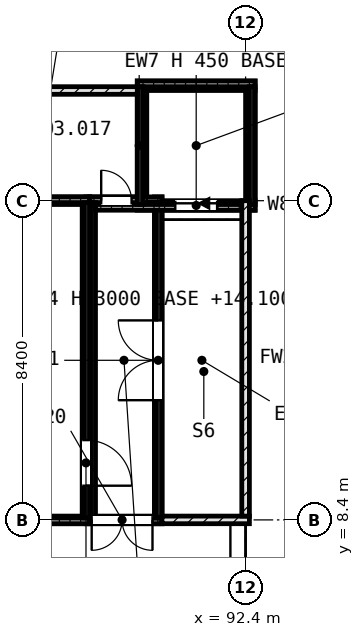
"""IFC4 building model, lengths in metres.
Left out: names, types, materials, properties, quantities, classifications, styles, units other than length and angle.
Written with IfcOpenShell. Run it as: python <this file> out.ifc"""

import sys

from ifc_helpers import new_model, si_unit, direction, frame, frame_2d, origin, place, context, subcontext, project, spatial, rectangle, extrude, element, fill, save


model = new_model("IFC4")
c1 = context("Model", 3, precision=1e-05, world=origin(), true_north=direction((0.0, 1.0)))
c2 = subcontext(c1, "Body", "Model", "MODEL_VIEW")
j1 = project(units=[si_unit("LENGTHUNIT", "METRE"), si_unit("PLANEANGLEUNIT", "RADIAN")], contexts=[c1])
p1 = place(None, origin())
s1 = spatial("IfcSite", under=j1, at=p1, CompositionType="ELEMENT")
p2 = place(p1, origin())
s2 = spatial("IfcBuilding", under=s1, at=p2, CompositionType="ELEMENT")
p3 = place(p2, frame((0.0, 0.0, 14.4)))
s3 = spatial("IfcBuildingStorey", under=s2, at=p3, CompositionType="ELEMENT", Elevation=14.4)
p4 = place(p3, frame((89.55, 16.675, -0.3), z_axis=(0.0, 0.0, 1.0), x_axis=(1.0, 0.0, 0.0)))
e1 = element("IfcWall", 1, at=p4, inside=s3, PredefinedType="SHEAR", context=c2, shape_type="SweptSolid", body=[
    extrude(rectangle(XDim=3.1, YDim=0.25, at=frame_2d((1.55, 0.0))), origin(), (0.0, 0.0, 1.0), 3.0),
])
p5 = place(p4, frame((1.0, 0.0, 0.3)))
e2 = element("IfcOpeningElement", 2, at=p5, cuts=e1, PredefinedType="OPENING", context=c2, shape_type="SweptSolid", body=[
    extrude(rectangle(XDim=1.1, YDim=2.1, at=frame_2d((0.55, 1.05))), frame((0.0, 0.135, 0.0), z_axis=(0.0, -1.0, 0.0), x_axis=(1.0, 0.0, 0.0)), (0.0, 0.0, 1.0), 0.27),
])
p6 = place(p3, frame((89.55, 19.825, -0.3), z_axis=(0.0, 0.0, 1.0), x_axis=(1.0, 0.0, 0.0)))
e3 = element("IfcWall", 3, at=p6, inside=s3, PredefinedType="SHEAR", context=c2, shape_type="SweptSolid", body=[
    extrude(rectangle(XDim=3.1, YDim=0.25, at=frame_2d((1.55, 0.0))), origin(), (0.0, 0.0, 1.0), 3.0),
])
for number, where, z_axis, x_axis in (
    (4, (89.675, 16.8, -0.3), (0.0, 0.0, 1.0), (0.0, 1.0, 0.0)),
    (5, (92.525, 16.8, -0.3), (0.0, 0.0, 1.0), (0.0, 1.0, 0.0)),
):
    element("IfcWall", number, at=place(p3, frame(where, z_axis=z_axis, x_axis=x_axis)), inside=s3, PredefinedType="SHEAR", context=c2, shape_type="SweptSolid", body=[
        extrude(rectangle(XDim=2.9, YDim=0.25, at=frame_2d((1.45, 0.0))), origin(), (0.0, 0.0, 1.0), 3.0),
    ])
for number, where, z_axis, x_axis in (
    (6, (83.9, 8.4, -0.3), (0.0, 0.0, 1.0), (1.0, 0.0, 0.0)),
    (7, (83.9, 16.8, -0.3), (0.0, 0.0, 1.0), (1.0, 0.0, 0.0)),
):
    element("IfcWall", number, at=place(p3, frame(where, z_axis=z_axis, x_axis=x_axis)), inside=s3, PredefinedType="SHEAR", context=c2, shape_type="SweptSolid", body=[
        extrude(rectangle(XDim=4.4, YDim=0.2, at=frame_2d((2.2, 0.0))), origin(), (0.0, 0.0, 1.0), 3.0),
    ])
p7 = place(p3, frame((88.2, 8.5, -0.3), z_axis=(0.0, 0.0, 1.0), x_axis=(0.0, 1.0, 0.0)))
e8 = element("IfcWall", 8, at=p7, inside=s3, PredefinedType="SHEAR", context=c2, shape_type="SweptSolid", body=[
    extrude(rectangle(XDim=8.2, YDim=0.2, at=frame_2d((4.1, 0.0))), origin(), (0.0, 0.0, 1.0), 3.0),
])
p8 = place(p7, frame((0.8, 0.0, 0.3)))
e9 = element("IfcOpeningElement", 9, at=p8, cuts=e8, PredefinedType="OPENING", context=c2, shape_type="SweptSolid", body=[
    extrude(rectangle(XDim=1.2, YDim=2.2, at=frame_2d((0.6, 1.1))), frame((0.0, 0.11, 0.0), z_axis=(0.0, -1.0, 0.0), x_axis=(1.0, 0.0, 0.0)), (0.0, 0.0, 1.0), 0.22),
])
p9 = place(p3, frame((88.2, 8.4, -0.3), z_axis=(0.0, 0.0, 1.0), x_axis=(1.0, 0.0, 0.0)))
e10 = element("IfcWall", 10, at=p9, inside=s3, PredefinedType="SHEAR", context=c2, shape_type="SweptSolid", body=[
    extrude(rectangle(XDim=1.9, YDim=0.2, at=frame_2d((0.95, 0.0))), origin(), (0.0, 0.0, 1.0), 3.0),
])
p10 = place(p9, frame((1.75, 0.0, 0.3), z_axis=(0.0, 0.0, 1.0), x_axis=(-1.0, 0.0, 0.0)))
e11 = element("IfcOpeningElement", 11, at=p10, cuts=e10, PredefinedType="OPENING", context=c2, shape_type="SweptSolid", body=[
    extrude(rectangle(XDim=1.6, YDim=2.2, at=frame_2d((0.8, 1.1))), frame((0.0, 0.11, 0.0), z_axis=(0.0, -1.0, 0.0), x_axis=(1.0, 0.0, 0.0)), (0.0, 0.0, 1.0), 0.22),
])
p11 = place(p3, frame((88.2, 16.8, -0.3), z_axis=(0.0, 0.0, 1.0), x_axis=(1.0, 0.0, 0.0)))
e12 = element("IfcWall", 12, at=p11, inside=s3, PredefinedType="SHEAR", context=c2, shape_type="SweptSolid", body=[
    extrude(rectangle(XDim=1.35, YDim=0.2, at=frame_2d((0.675, 0.0))), origin(), (0.0, 0.0, 1.0), 3.0),
])
p12 = place(p11, frame((0.4, 0.0, 0.3)))
e13 = element("IfcOpeningElement", 13, at=p12, cuts=e12, PredefinedType="OPENING", context=c2, shape_type="SweptSolid", body=[
    extrude(rectangle(XDim=0.8, YDim=2.1, at=frame_2d((0.4, 1.05))), frame((0.0, 0.11, 0.0), z_axis=(0.0, -1.0, 0.0), x_axis=(1.0, 0.0, 0.0)), (0.0, 0.0, 1.0), 0.22),
])
p13 = place(p3, frame((90.1, 8.3, -0.3), z_axis=(0.0, 0.0, 1.0), x_axis=(0.0, 1.0, 0.0)))
e14 = element("IfcWall", 14, at=p13, inside=s3, PredefinedType="SHEAR", context=c2, shape_type="SweptSolid", body=[
    extrude(rectangle(XDim=8.6, YDim=0.2, at=frame_2d((4.3, 0.0))), origin(), (0.0, 0.0, 1.0), 3.0),
])
p14 = place(p13, frame((3.25, 0.0, 0.3)))
e15 = element("IfcOpeningElement", 15, at=p14, cuts=e14, PredefinedType="OPENING", context=c2, shape_type="SweptSolid", body=[
    extrude(rectangle(XDim=2.1, YDim=2.2, at=frame_2d((1.05, 1.1))), frame((0.0, 0.11, 0.0), z_axis=(0.0, -1.0, 0.0), x_axis=(1.0, 0.0, 0.0)), (0.0, 0.0, 1.0), 0.22),
])
for number, where, z_axis, x_axis in (
    (16, (83.9, 8.375, 2.9), (0.0, 0.0, 1.0), (1.0, 0.0, 0.0)),
    (17, (83.9, 16.825, 2.9), (0.0, 0.0, 1.0), (1.0, 0.0, 0.0)),
):
    element("IfcWall", number, at=place(p3, frame(where, z_axis=z_axis, x_axis=x_axis)), inside=s3, PredefinedType="PARAPET", context=c2, shape_type="SweptSolid", body=[
        extrude(rectangle(XDim=4.4, YDim=0.15, at=frame_2d((2.2, 0.0))), origin(), (0.0, 0.0, 1.0), 0.45),
    ])
p15 = place(p3, frame((88.225, 8.45, 2.9), z_axis=(0.0, 0.0, 1.0), x_axis=(0.0, 1.0, 0.0)))
e18 = element("IfcWall", 18, at=p15, inside=s3, PredefinedType="PARAPET", context=c2, shape_type="SweptSolid", body=[
    extrude(rectangle(XDim=8.3, YDim=0.15, at=frame_2d((4.15, 0.0))), origin(), (0.0, 0.0, 1.0), 0.45),
])
for number, where, z_axis, x_axis in (
    (19, (88.3, 8.375, 2.9), (0.0, 0.0, 1.0), (1.0, 0.0, 0.0)),
    (20, (88.3, 16.825, 2.9), (0.0, 0.0, 1.0), (1.0, 0.0, 0.0)),
):
    element("IfcWall", number, at=place(p3, frame(where, z_axis=z_axis, x_axis=x_axis)), inside=s3, PredefinedType="PARAPET", context=c2, shape_type="SweptSolid", body=[
        extrude(rectangle(XDim=1.9, YDim=0.15, at=frame_2d((0.95, 0.0))), origin(), (0.0, 0.0, 1.0), 0.45),
    ])
for number, where, z_axis, x_axis in (
    (21, (88.375, 8.45, 2.9), (0.0, 0.0, 1.0), (0.0, 1.0, 0.0)),
    (22, (90.125, 8.45, 2.9), (0.0, 0.0, 1.0), (0.0, 1.0, 0.0)),
):
    element("IfcWall", number, at=place(p3, frame(where, z_axis=z_axis, x_axis=x_axis)), inside=s3, PredefinedType="PARAPET", context=c2, shape_type="SweptSolid", body=[
        extrude(rectangle(XDim=8.3, YDim=0.15, at=frame_2d((4.15, 0.0))), origin(), (0.0, 0.0, 1.0), 0.45),
    ])
p16 = place(p3, frame((88.45, 16.625, 2.9), z_axis=(0.0, 0.0, 1.0), x_axis=(1.0, 0.0, 0.0)))
e23 = element("IfcWall", 23, at=p16, inside=s3, PredefinedType="PARAPET", context=c2, shape_type="SweptSolid", body=[
    extrude(rectangle(XDim=4.2, YDim=0.15, at=frame_2d((2.1, 0.0))), origin(), (0.0, 0.0, 1.0), 0.45),
])
p17 = place(p3, frame((89.55, 19.875, 2.9), z_axis=(0.0, 0.0, 1.0), x_axis=(1.0, 0.0, 0.0)))
e24 = element("IfcWall", 24, at=p17, inside=s3, PredefinedType="PARAPET", context=c2, shape_type="SweptSolid", body=[
    extrude(rectangle(XDim=3.1, YDim=0.15, at=frame_2d((1.55, 0.0))), origin(), (0.0, 0.0, 1.0), 0.45),
])
for number, where, z_axis, x_axis in (
    (25, (89.625, 16.7, 2.9), (0.0, 0.0, 1.0), (0.0, 1.0, 0.0)),
    (26, (92.575, 16.7, 2.9), (0.0, 0.0, 1.0), (0.0, 1.0, 0.0)),
):
    element("IfcWall", number, at=place(p3, frame(where, z_axis=z_axis, x_axis=x_axis)), inside=s3, PredefinedType="PARAPET", context=c2, shape_type="SweptSolid", body=[
        extrude(rectangle(XDim=3.1, YDim=0.15, at=frame_2d((1.55, 0.0))), origin(), (0.0, 0.0, 1.0), 0.45),
    ])
p18 = place(p3, frame((90.2, 8.4, 0.0), z_axis=(0.0, 0.0, 1.0), x_axis=(1.0, 0.0, 0.0)))
e27 = element("IfcWall", 27, at=p18, inside=s3, PredefinedType="SOLIDWALL", context=c2, shape_type="SweptSolid", body=[
    extrude(rectangle(XDim=2.3, YDim=0.2, at=frame_2d((1.15, 0.0))), origin(), (0.0, 0.0, 1.0), 2.7),
])
p19 = place(p3, frame((84.0, 19.7, 0.0), z_axis=(0.0, 0.0, 1.0), x_axis=(1.0, 0.0, 0.0)))
e28 = element("IfcWall", 28, at=p19, inside=s3, PredefinedType="SOLIDWALL", context=c2, shape_type="SweptSolid", body=[
    extrude(rectangle(XDim=5.55, YDim=0.2, at=frame_2d((2.775, 0.0))), origin(), (0.0, 0.0, 1.0), 2.7),
])
p20 = place(p3, frame((92.4, 8.5, 0.0), z_axis=(0.0, 0.0, 1.0), x_axis=(0.0, 1.0, 0.0)))
e29 = element("IfcWall", 29, at=p20, inside=s3, PredefinedType="SOLIDWALL", context=c2, shape_type="SweptSolid", body=[
    extrude(rectangle(XDim=8.3, YDim=0.2, at=frame_2d((4.15, 0.0))), origin(), (0.0, 0.0, 1.0), 2.7),
])
p21 = place(p14, origin())
e30 = element("IfcDoor", 30, at=p21, inside=s3, OperationType="DOUBLE_DOOR_SINGLE_SWING", PredefinedType="DOOR", context=c2, shape_type="SweptSolid", body=[
    extrude(rectangle(XDim=2.1, YDim=2.2, at=frame_2d((1.05, 1.1))), frame((0.0, 0.025, 0.0), z_axis=(0.0, -1.0, 0.0), x_axis=(1.0, 0.0, 0.0)), (0.0, 0.0, 1.0), 0.05),
])
fill(e15, e30)
p22 = place(p8, origin())
e31 = element("IfcDoor", 31, at=p22, inside=s3, OperationType="SINGLE_SWING_LEFT", PredefinedType="DOOR", context=c2, shape_type="SweptSolid", body=[
    extrude(rectangle(XDim=1.2, YDim=2.2, at=frame_2d((0.6, 1.1))), frame((0.0, 0.025, 0.0), z_axis=(0.0, -1.0, 0.0), x_axis=(1.0, 0.0, 0.0)), (0.0, 0.0, 1.0), 0.05),
])
fill(e9, e31)
p23 = place(p5, origin())
e32 = element("IfcDoor", 32, at=p23, inside=s3, OperationType="SLIDING_TO_LEFT", PredefinedType="DOOR", context=c2, shape_type="SweptSolid", body=[
    extrude(rectangle(XDim=1.1, YDim=2.1, at=frame_2d((0.55, 1.05))), frame((0.0, 0.025, 0.0), z_axis=(0.0, -1.0, 0.0), x_axis=(1.0, 0.0, 0.0)), (0.0, 0.0, 1.0), 0.05),
])
fill(e2, e32)
p24 = place(p12, origin())
e33 = element("IfcDoor", 33, at=p24, inside=s3, OperationType="SINGLE_SWING_RIGHT", PredefinedType="DOOR", context=c2, shape_type="SweptSolid", body=[
    extrude(rectangle(XDim=0.8, YDim=2.1, at=frame_2d((0.4, 1.05))), frame((0.0, 0.025, 0.0), z_axis=(0.0, -1.0, 0.0), x_axis=(1.0, 0.0, 0.0)), (0.0, 0.0, 1.0), 0.05),
])
fill(e13, e33)
p25 = place(p10, origin())
e34 = element("IfcDoor", 34, at=p25, inside=s3, OperationType="DOUBLE_DOOR_SINGLE_SWING", PredefinedType="DOOR", context=c2, shape_type="SweptSolid", body=[
    extrude(rectangle(XDim=1.6, YDim=0.013, at=frame_2d((0.8, 0.007))), frame((0.0, 0.088, 0.0), z_axis=(0.0, -1.0, 0.0), x_axis=(1.0, 0.0, 0.0)), (0.0, 0.0, 1.0), 0.176),
    extrude(rectangle(XDim=0.075, YDim=2.112, at=frame_2d((0.038, 1.069))), frame((0.0, 0.098, 0.0), z_axis=(0.0, -1.0, 0.0), x_axis=(1.0, 0.0, 0.0)), (0.0, 0.0, 1.0), 0.196),
    extrude(rectangle(XDim=0.075, YDim=2.112, at=frame_2d((1.562, 1.069))), frame((0.0, 0.098, 0.0), z_axis=(0.0, -1.0, 0.0), x_axis=(1.0, 0.0, 0.0)), (0.0, 0.0, 1.0), 0.196),
    extrude(rectangle(XDim=1.6, YDim=0.075, at=frame_2d((0.8, 2.163))), frame((0.0, 0.088, 0.0), z_axis=(0.0, -1.0, 0.0), x_axis=(1.0, 0.0, 0.0)), (0.0, 0.0, 1.0), 0.176),
    extrude(rectangle(XDim=1.45, YDim=2.112, at=frame_2d((0.8, 1.069))), frame((0.0, 0.025, 0.0), z_axis=(0.0, -1.0, 0.0), x_axis=(1.0, 0.0, 0.0)), (0.0, 0.0, 1.0), 0.05),
])
fill(e11, e34)
save(model, sys.argv[1])
